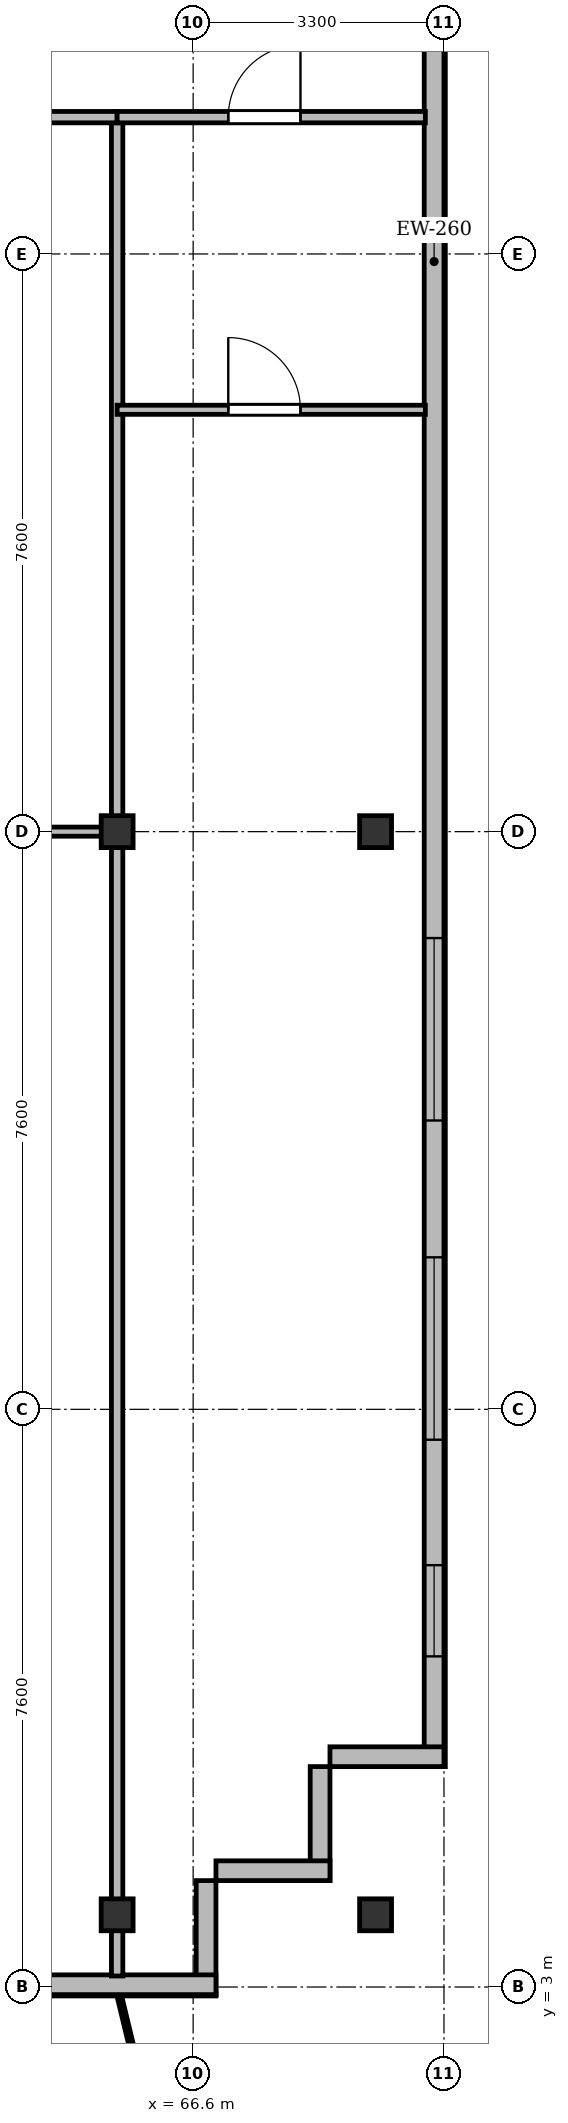
"""IFC4 building model, lengths in metres.
Left out: names, types, materials, properties, quantities, classifications, styles, units other than length and angle.
Written with IfcOpenShell. Run it as: python <this file> out.ifc"""

import sys

from ifc_helpers import new_model, si_unit, direction, frame, frame_2d, origin, origin_2d, place, context, subcontext, project, spatial, rectangle, i_section, extrude, source, transform, mapped, element, fill, save


model = new_model("IFC4")
c1 = context("Model", 3, precision=1e-05, world=origin(), true_north=direction((0.0, 1.0)))
c2 = subcontext(c1, "Body", "Model", "MODEL_VIEW")
j1 = project(units=[si_unit("LENGTHUNIT", "METRE"), si_unit("PLANEANGLEUNIT", "RADIAN")], contexts=[c1])
p1 = place(None, origin())
s1 = spatial("IfcSite", under=j1, at=p1, CompositionType="ELEMENT")
p2 = place(p1, origin())
s2 = spatial("IfcBuilding", under=s1, at=p2, CompositionType="ELEMENT")
p3 = place(p2, frame((0.0, 0.0, 30.7)))
s3 = spatial("IfcBuildingStorey", under=s2, at=p3, CompositionType="ELEMENT", Elevation=30.7)
m1 = source(origin(), c2, "Body", "SweptSolid", [
    extrude(i_section(OverallWidth=0.42, OverallDepth=0.42, WebThickness=0.026, FlangeThickness=0.04, at=origin_2d()), origin(), (0.0, 0.0, 1.0), 3.6),
])
for number, where, z_axis, x_axis in (
    (1, (65.6, 3.95, 0.0), (0.0, 0.0, 1.0), (1.0, 0.0, 0.0)),
    (2, (65.6, 18.2, 0.0), (0.0, 0.0, 1.0), (1.0, 0.0, 0.0)),
    (3, (69.0, 3.95, 0.0), (0.0, 0.0, 1.0), (1.0, 0.0, 0.0)),
    (4, (69.0, 18.2, 0.0), (0.0, 0.0, 1.0), (1.0, 0.0, 0.0)),
):
    element("IfcColumn", number, at=place(p3, frame(where, z_axis=z_axis, x_axis=x_axis)), inside=s3, PredefinedType="COLUMN", context=c2, shape_type="MappedRepresentation", body=[
        mapped(m1, transform((0.0, 0.0, 0.0), x_axis=(1.0, 0.0, 0.0), y_axis=(0.0, 1.0, 0.0), z_axis=(0.0, 0.0, 1.0), scale=1.0)),
    ])
p4 = place(p3, frame((69.77, 45.5, 0.0), z_axis=(0.0, 0.0, 1.0), x_axis=(0.0, -1.0, 0.0)))
e5 = element("IfcWall", 5, at=p4, inside=s3, PredefinedType="SOLIDWALL", context=c2, shape_type="SweptSolid", body=[
    extrude(rectangle(XDim=39.6, YDim=0.26, at=frame_2d((19.8, 0.0))), origin(), (0.0, 0.0, 1.0), 3.34),
])
p5 = place(p4, frame((36.95, 0.0, 0.92)))
e6 = element("IfcOpeningElement", 6, at=p5, cuts=e5, PredefinedType="OPENING", context=c2, shape_type="SweptSolid", body=[
    extrude(rectangle(XDim=1.2, YDim=1.65, at=frame_2d((0.6, 0.825))), frame((0.0, 0.14, 0.0), z_axis=(0.0, -1.0, 0.0), x_axis=(1.0, 0.0, 0.0)), (0.0, 0.0, 1.0), 0.28),
])
p6 = place(p4, frame((32.9, 0.0, 0.92)))
e7 = element("IfcOpeningElement", 7, at=p6, cuts=e5, PredefinedType="OPENING", context=c2, shape_type="SweptSolid", body=[
    extrude(rectangle(XDim=2.4, YDim=2.1, at=frame_2d((1.2, 1.05))), frame((0.0, 0.14, 0.0), z_axis=(0.0, -1.0, 0.0), x_axis=(1.0, 0.0, 0.0)), (0.0, 0.0, 1.0), 0.28),
])
p7 = place(p4, frame((28.7, 0.0, 0.92)))
e8 = element("IfcOpeningElement", 8, at=p7, cuts=e5, PredefinedType="OPENING", context=c2, shape_type="SweptSolid", body=[
    extrude(rectangle(XDim=2.4, YDim=2.1, at=frame_2d((1.2, 1.05))), frame((0.0, 0.14, 0.0), z_axis=(0.0, -1.0, 0.0), x_axis=(1.0, 0.0, 0.0)), (0.0, 0.0, 1.0), 0.28),
])
p8 = place(p4, frame((7.5, 0.0, 0.92)))
e9 = element("IfcOpeningElement", 9, at=p8, cuts=e5, PredefinedType="OPENING", context=c2, shape_type="SweptSolid", body=[
    extrude(rectangle(XDim=2.4, YDim=2.1, at=frame_2d((1.2, 1.05))), frame((0.0, 0.14, 0.0), z_axis=(0.0, -1.0, 0.0), x_axis=(1.0, 0.0, 0.0)), (0.0, 0.0, 1.0), 0.28),
])
p9 = place(p4, frame((4.5, 0.0, 0.92)))
e10 = element("IfcOpeningElement", 10, at=p9, cuts=e5, PredefinedType="OPENING", context=c2, shape_type="SweptSolid", body=[
    extrude(rectangle(XDim=1.2, YDim=1.65, at=frame_2d((0.6, 0.825))), frame((0.0, 0.14, 0.0), z_axis=(0.0, -1.0, 0.0), x_axis=(1.0, 0.0, 0.0)), (0.0, 0.0, 1.0), 0.28),
])
p10 = place(p4, frame((1.15, 0.0, 0.92)))
e11 = element("IfcOpeningElement", 11, at=p10, cuts=e5, PredefinedType="OPENING", context=c2, shape_type="SweptSolid", body=[
    extrude(rectangle(XDim=1.2, YDim=1.65, at=frame_2d((0.6, 0.825))), frame((0.0, 0.14, 0.0), z_axis=(0.0, -1.0, 0.0), x_axis=(1.0, 0.0, 0.0)), (0.0, 0.0, 1.0), 0.28),
])
p11 = place(p3, frame((69.9, 6.03, 0.0), z_axis=(0.0, 0.0, 1.0), x_axis=(-1.0, 0.0, 0.0)))
e12 = element("IfcWall", 12, at=p11, inside=s3, PredefinedType="SOLIDWALL", context=c2, shape_type="SweptSolid", body=[
    extrude(rectangle(XDim=1.5, YDim=0.26, at=frame_2d((0.75, 0.0))), origin(), (0.0, 0.0, 1.0), 2.752),
])
for number, where, z_axis, x_axis in (
    (13, (68.27, 5.9, 0.0), (0.0, 0.0, 1.0), (0.0, -1.0, 0.0)),
    (14, (68.4, 4.53, 0.0), (0.0, 0.0, 1.0), (-1.0, 0.0, 0.0)),
):
    element("IfcWall", number, at=place(p3, frame(where, z_axis=z_axis, x_axis=x_axis)), inside=s3, PredefinedType="SOLIDWALL", context=c2, shape_type="SweptSolid", body=[
        extrude(rectangle(XDim=1.5, YDim=0.26, at=frame_2d((0.75, 0.0))), origin(), (0.0, 0.0, 1.0), 3.34),
    ])
p12 = place(p3, frame((66.77, 4.4, 0.0), z_axis=(0.0, 0.0, 1.0), x_axis=(0.0, -1.0, 0.0)))
e15 = element("IfcWall", 15, at=p12, inside=s3, PredefinedType="SOLIDWALL", context=c2, shape_type="SweptSolid", body=[
    extrude(rectangle(XDim=1.5, YDim=0.26, at=frame_2d((0.75, 0.0))), origin(), (0.0, 0.0, 1.0), 2.69),
])
p13 = place(p3, frame((66.9, 3.03, 0.0), z_axis=(0.0, 0.0, 1.0), x_axis=(-1.0, 0.0, 0.0)))
e16 = element("IfcWall", 16, at=p13, inside=s3, PredefinedType="SOLIDWALL", context=c2, shape_type="SweptSolid", body=[
    extrude(rectangle(XDim=59.4, YDim=0.26, at=frame_2d((29.7, 0.0))), origin(), (0.0, 0.0, 1.0), 3.34),
])
p14 = place(p13, frame((3.7, 0.0, 0.9)))
e17 = element("IfcOpeningElement", 17, at=p14, cuts=e16, PredefinedType="OPENING", context=c2, shape_type="SweptSolid", body=[
    extrude(rectangle(XDim=2.0, YDim=1.95, at=frame_2d((1.0, 0.975))), frame((0.0, 0.14, 0.0), z_axis=(0.0, -1.0, 0.0), x_axis=(1.0, 0.0, 0.0)), (0.0, 0.0, 1.0), 0.28),
])
p15 = place(p13, frame((9.225, 0.0, 0.9)))
e18 = element("IfcOpeningElement", 18, at=p15, cuts=e16, PredefinedType="OPENING", context=c2, shape_type="SweptSolid", body=[
    extrude(rectangle(XDim=1.65, YDim=1.85, at=frame_2d((0.825, 0.925))), frame((0.0, 0.14, 0.0), z_axis=(0.0, -1.0, 0.0), x_axis=(1.0, 0.0, 0.0)), (0.0, 0.0, 1.0), 0.28),
])
p16 = place(p13, frame((13.05, 0.0, 0.9)))
e19 = element("IfcOpeningElement", 19, at=p16, cuts=e16, PredefinedType="OPENING", context=c2, shape_type="SweptSolid", body=[
    extrude(rectangle(XDim=1.8, YDim=1.8, at=frame_2d((0.9, 0.9))), frame((0.0, 0.14, 0.0), z_axis=(0.0, -1.0, 0.0), x_axis=(1.0, 0.0, 0.0)), (0.0, 0.0, 1.0), 0.28),
])
p17 = place(p13, frame((17.007, 0.0, 0.0)))
e20 = element("IfcOpeningElement", 20, at=p17, cuts=e16, PredefinedType="OPENING", context=c2, shape_type="SweptSolid", body=[
    extrude(rectangle(XDim=1.2, YDim=2.2, at=frame_2d((0.6, 1.1))), frame((0.0, 0.14, 0.0), z_axis=(0.0, -1.0, 0.0), x_axis=(1.0, 0.0, 0.0)), (0.0, 0.0, 1.0), 0.28),
])
p18 = place(p13, frame((20.55, 0.0, 0.9)))
e21 = element("IfcOpeningElement", 21, at=p18, cuts=e16, PredefinedType="OPENING", context=c2, shape_type="SweptSolid", body=[
    extrude(rectangle(XDim=1.5, YDim=1.75, at=frame_2d((0.75, 0.875))), frame((0.0, 0.14, 0.0), z_axis=(0.0, -1.0, 0.0), x_axis=(1.0, 0.0, 0.0)), (0.0, 0.0, 1.0), 0.28),
])
p19 = place(p13, frame((23.75, 0.0, 0.9)))
e22 = element("IfcOpeningElement", 22, at=p19, cuts=e16, PredefinedType="OPENING", context=c2, shape_type="SweptSolid", body=[
    extrude(rectangle(XDim=2.0, YDim=1.95, at=frame_2d((1.0, 0.975))), frame((0.0, 0.14, 0.0), z_axis=(0.0, -1.0, 0.0), x_axis=(1.0, 0.0, 0.0)), (0.0, 0.0, 1.0), 0.28),
])
p20 = place(p13, frame((27.225, 0.0, 0.9)))
e23 = element("IfcOpeningElement", 23, at=p20, cuts=e16, PredefinedType="OPENING", context=c2, shape_type="SweptSolid", body=[
    extrude(rectangle(XDim=1.65, YDim=1.85, at=frame_2d((0.825, 0.925))), frame((0.0, 0.14, 0.0), z_axis=(0.0, -1.0, 0.0), x_axis=(1.0, 0.0, 0.0)), (0.0, 0.0, 1.0), 0.28),
])
p21 = place(p13, frame((32.1, 0.0, 0.9)))
e24 = element("IfcOpeningElement", 24, at=p21, cuts=e16, PredefinedType="OPENING", context=c2, shape_type="SweptSolid", body=[
    extrude(rectangle(XDim=1.8, YDim=1.8, at=frame_2d((0.9, 0.9))), frame((0.0, 0.14, 0.0), z_axis=(0.0, -1.0, 0.0), x_axis=(1.0, 0.0, 0.0)), (0.0, 0.0, 1.0), 0.28),
])
p22 = place(p13, frame((36.75, 0.0, 0.9)))
e25 = element("IfcOpeningElement", 25, at=p22, cuts=e16, PredefinedType="OPENING", context=c2, shape_type="SweptSolid", body=[
    extrude(rectangle(XDim=1.5, YDim=1.75, at=frame_2d((0.75, 0.875))), frame((0.0, 0.14, 0.0), z_axis=(0.0, -1.0, 0.0), x_axis=(1.0, 0.0, 0.0)), (0.0, 0.0, 1.0), 0.28),
])
p23 = place(p13, frame((39.15, 0.0, 0.9)))
e26 = element("IfcOpeningElement", 26, at=p23, cuts=e16, PredefinedType="OPENING", context=c2, shape_type="SweptSolid", body=[
    extrude(rectangle(XDim=1.5, YDim=1.75, at=frame_2d((0.75, 0.875))), frame((0.0, 0.14, 0.0), z_axis=(0.0, -1.0, 0.0), x_axis=(1.0, 0.0, 0.0)), (0.0, 0.0, 1.0), 0.28),
])
p24 = place(p13, frame((41.3, 0.0, 0.9)))
e27 = element("IfcOpeningElement", 27, at=p24, cuts=e16, PredefinedType="OPENING", context=c2, shape_type="SweptSolid", body=[
    extrude(rectangle(XDim=2.0, YDim=1.95, at=frame_2d((1.0, 0.975))), frame((0.0, 0.14, 0.0), z_axis=(0.0, -1.0, 0.0), x_axis=(1.0, 0.0, 0.0)), (0.0, 0.0, 1.0), 0.28),
])
p25 = place(p13, frame((45.435, 0.0, 0.0)))
e28 = element("IfcOpeningElement", 28, at=p25, cuts=e16, PredefinedType="OPENING", context=c2, shape_type="SweptSolid", body=[
    extrude(rectangle(XDim=1.2, YDim=2.2, at=frame_2d((0.6, 1.1))), frame((0.0, 0.14, 0.0), z_axis=(0.0, -1.0, 0.0), x_axis=(1.0, 0.0, 0.0)), (0.0, 0.0, 1.0), 0.28),
])
p26 = place(p13, frame((48.45, 0.0, 0.9)))
e29 = element("IfcOpeningElement", 29, at=p26, cuts=e16, PredefinedType="OPENING", context=c2, shape_type="SweptSolid", body=[
    extrude(rectangle(XDim=1.8, YDim=1.8, at=frame_2d((0.9, 0.9))), frame((0.0, 0.14, 0.0), z_axis=(0.0, -1.0, 0.0), x_axis=(1.0, 0.0, 0.0)), (0.0, 0.0, 1.0), 0.28),
])
p27 = place(p13, frame((51.9, 0.0, 0.9)))
e30 = element("IfcOpeningElement", 30, at=p27, cuts=e16, PredefinedType="OPENING", context=c2, shape_type="SweptSolid", body=[
    extrude(rectangle(XDim=2.2, YDim=1.8, at=frame_2d((1.1, 0.9))), frame((0.0, 0.14, 0.0), z_axis=(0.0, -1.0, 0.0), x_axis=(1.0, 0.0, 0.0)), (0.0, 0.0, 1.0), 0.28),
])
p28 = place(p13, frame((55.65, 0.0, 0.9)))
e31 = element("IfcOpeningElement", 31, at=p28, cuts=e16, PredefinedType="OPENING", context=c2, shape_type="SweptSolid", body=[
    extrude(rectangle(XDim=1.5, YDim=1.75, at=frame_2d((0.75, 0.875))), frame((0.0, 0.14, 0.0), z_axis=(0.0, -1.0, 0.0), x_axis=(1.0, 0.0, 0.0)), (0.0, 0.0, 1.0), 0.28),
])
p29 = place(p3, frame((65.6, 3.145, 0.0), z_axis=(0.0, 0.0, 1.0), x_axis=(0.0, 1.0, 0.0)))
e32 = element("IfcWall", 32, at=p29, inside=s3, PredefinedType="PARTITIONING", context=c2, shape_type="SweptSolid", body=[
    extrude(rectangle(XDim=24.455, YDim=0.15, at=frame_2d((12.228, 0.0))), origin(), (0.0, 0.0, 1.0), 2.752),
])
p30 = place(p3, frame((58.8, 27.6, 0.0), z_axis=(0.0, 0.0, 1.0), x_axis=(1.0, 0.0, 0.0)))
e33 = element("IfcWall", 33, at=p30, inside=s3, PredefinedType="PARTITIONING", context=c2, shape_type="SweptSolid", body=[
    extrude(rectangle(XDim=6.8, YDim=0.15, at=frame_2d((3.4, 0.0))), origin(), (0.0, 0.0, 1.0), 2.752),
])
p31 = place(p30, frame((2.925, 0.0, 0.0)))
e34 = element("IfcOpeningElement", 34, at=p31, cuts=e33, PredefinedType="OPENING", context=c2, shape_type="SweptSolid", body=[
    extrude(rectangle(XDim=0.95, YDim=2.15, at=frame_2d((0.475, 1.075))), frame((0.0, 0.085, 0.0), z_axis=(0.0, -1.0, 0.0), x_axis=(1.0, 0.0, 0.0)), (0.0, 0.0, 1.0), 0.17),
])
p32 = place(p3, frame((58.8, 18.2, 0.0), z_axis=(0.0, 0.0, 1.0), x_axis=(1.0, 0.0, 0.0)))
e35 = element("IfcWall", 35, at=p32, inside=s3, PredefinedType="PARTITIONING", context=c2, shape_type="SweptSolid", body=[
    extrude(rectangle(XDim=6.8, YDim=0.12, at=frame_2d((3.4, 0.0))), origin(), (0.0, 0.0, 1.0), 2.69),
])
p33 = place(p32, frame((2.925, 0.0, 0.0)))
e36 = element("IfcOpeningElement", 36, at=p33, cuts=e35, PredefinedType="OPENING", context=c2, shape_type="SweptSolid", body=[
    extrude(rectangle(XDim=0.95, YDim=2.15, at=frame_2d((0.475, 1.075))), frame((0.0, 0.07, 0.0), z_axis=(0.0, -1.0, 0.0), x_axis=(1.0, 0.0, 0.0)), (0.0, 0.0, 1.0), 0.14),
])
p34 = place(p3, frame((65.6, 27.6, 0.0), z_axis=(0.0, 0.0, 1.0), x_axis=(1.0, 0.0, 0.0)))
e37 = element("IfcWall", 37, at=p34, inside=s3, PredefinedType="PARTITIONING", context=c2, shape_type="SweptSolid", body=[
    extrude(rectangle(XDim=4.055, YDim=0.15, at=frame_2d((2.027, 0.0))), origin(), (0.0, 0.0, 1.0), 2.752),
])
p35 = place(p34, frame((1.462, 0.0, 0.0)))
e38 = element("IfcOpeningElement", 38, at=p35, cuts=e37, PredefinedType="OPENING", context=c2, shape_type="SweptSolid", body=[
    extrude(rectangle(XDim=0.95, YDim=2.15, at=frame_2d((0.475, 1.075))), frame((0.0, 0.085, 0.0), z_axis=(0.0, -1.0, 0.0), x_axis=(1.0, 0.0, 0.0)), (0.0, 0.0, 1.0), 0.17),
])
p36 = place(p3, frame((65.6, 23.75, 0.0), z_axis=(0.0, 0.0, 1.0), x_axis=(1.0, 0.0, 0.0)))
e39 = element("IfcWall", 39, at=p36, inside=s3, PredefinedType="PARTITIONING", context=c2, shape_type="SweptSolid", body=[
    extrude(rectangle(XDim=4.055, YDim=0.12, at=frame_2d((2.027, 0.0))), origin(), (0.0, 0.0, 1.0), 2.752),
])
p37 = place(p36, frame((1.462, 0.0, 0.0)))
e40 = element("IfcOpeningElement", 40, at=p37, cuts=e39, PredefinedType="OPENING", context=c2, shape_type="SweptSolid", body=[
    extrude(rectangle(XDim=0.95, YDim=2.15, at=frame_2d((0.475, 1.075))), frame((0.0, 0.07, 0.0), z_axis=(0.0, -1.0, 0.0), x_axis=(1.0, 0.0, 0.0)), (0.0, 0.0, 1.0), 0.14),
])
m2 = source(origin(), c2, "Body", "SweptSolid", [
    extrude(rectangle(XDim=1.2, YDim=1.65, at=frame_2d((0.6, 0.825))), frame((0.0, 0.03, 0.0), z_axis=(0.0, -1.0, 0.0), x_axis=(1.0, 0.0, 0.0)), (0.0, 0.0, 1.0), 0.06),
])
p38 = place(p5, origin())
e41 = element("IfcWindow", 41, at=p38, inside=s3, PartitioningType="SINGLE_PANEL", PredefinedType="WINDOW", context=c2, shape_type="MappedRepresentation", body=[
    mapped(m2, transform((0.0, 0.0, 0.0), x_axis=(1.0, 0.0, 0.0), y_axis=(0.0, 1.0, 0.0), z_axis=(0.0, 0.0, 1.0), scale=1.0)),
])
fill(e6, e41)
m3 = source(origin(), c2, "Body", "SweptSolid", [
    extrude(rectangle(XDim=2.4, YDim=2.1, at=frame_2d((1.2, 1.05))), frame((0.0, 0.03, 0.0), z_axis=(0.0, -1.0, 0.0), x_axis=(1.0, 0.0, 0.0)), (0.0, 0.0, 1.0), 0.06),
])
p39 = place(p6, origin())
e42 = element("IfcWindow", 42, at=p39, inside=s3, PartitioningType="SINGLE_PANEL", PredefinedType="WINDOW", context=c2, shape_type="MappedRepresentation", body=[
    mapped(m3, transform((0.0, 0.0, 0.0), x_axis=(1.0, 0.0, 0.0), y_axis=(0.0, 1.0, 0.0), z_axis=(0.0, 0.0, 1.0), scale=1.0)),
])
fill(e7, e42)
p40 = place(p7, origin())
e43 = element("IfcWindow", 43, at=p40, inside=s3, PartitioningType="SINGLE_PANEL", PredefinedType="WINDOW", context=c2, shape_type="MappedRepresentation", body=[
    mapped(m3, transform((0.0, 0.0, 0.0), x_axis=(1.0, 0.0, 0.0), y_axis=(0.0, 1.0, 0.0), z_axis=(0.0, 0.0, 1.0), scale=1.0)),
])
fill(e8, e43)
m4 = source(origin(), c2, "Body", "SweptSolid", [
    extrude(rectangle(XDim=0.95, YDim=2.15, at=frame_2d((0.475, 1.075))), frame((0.0, 0.025, 0.0), z_axis=(0.0, -1.0, 0.0), x_axis=(1.0, 0.0, 0.0)), (0.0, 0.0, 1.0), 0.05),
])
p41 = place(p35, origin())
e44 = element("IfcDoor", 44, at=p41, inside=s3, OperationType="SINGLE_SWING_RIGHT", PredefinedType="DOOR", context=c2, shape_type="MappedRepresentation", body=[
    mapped(m4, transform((0.0, 0.0, 0.0), x_axis=(1.0, 0.0, 0.0), y_axis=(0.0, 1.0, 0.0), z_axis=(0.0, 0.0, 1.0), scale=1.0)),
])
fill(e38, e44)
p42 = place(p37, origin())
e45 = element("IfcDoor", 45, at=p42, inside=s3, OperationType="SINGLE_SWING_LEFT", PredefinedType="DOOR", context=c2, shape_type="MappedRepresentation", body=[
    mapped(m4, transform((0.0, 0.0, 0.0), x_axis=(1.0, 0.0, 0.0), y_axis=(0.0, 1.0, 0.0), z_axis=(0.0, 0.0, 1.0), scale=1.0)),
])
fill(e40, e45)
save(model, sys.argv[1])
